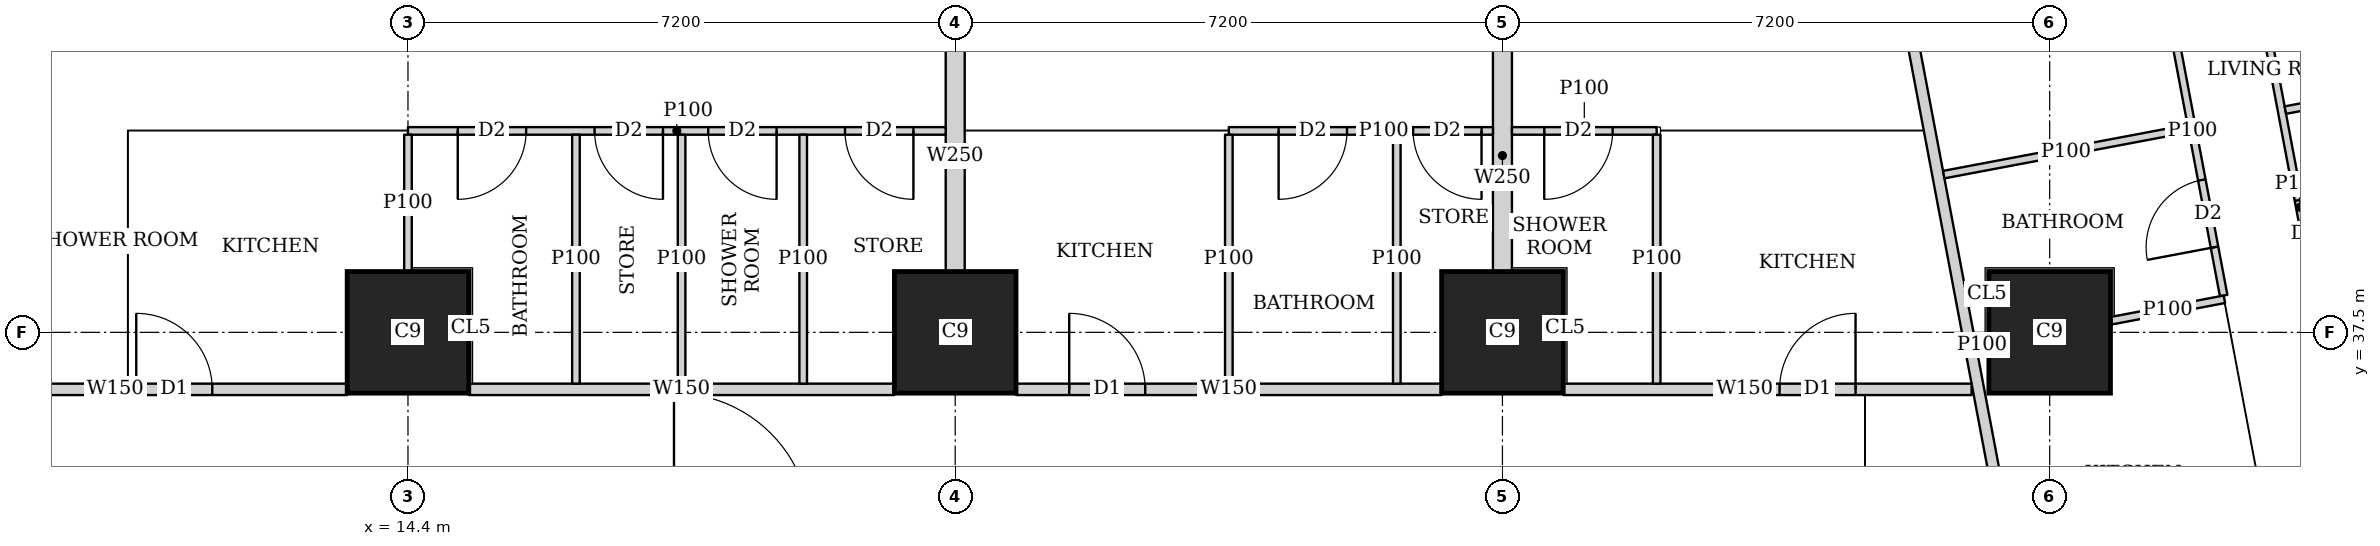
"""IFC4 building model, lengths in metres.
Left out: names, types, materials, properties, quantities, classifications, styles, units other than length and angle.
Written with IfcOpenShell. Run it as: python <this file> out.ifc"""

import sys

from ifc_helpers import new_model, si_unit, direction, frame, frame_2d, origin, origin_2d, place, context, subcontext, project, spatial, rectangle, extrude, element, fill, save


model = new_model("IFC4")
c1 = context("Model", 3, precision=1e-05, world=origin(), true_north=direction((0.0, 1.0)))
c2 = subcontext(c1, "Body", "Model", "MODEL_VIEW")
j1 = project(units=[si_unit("LENGTHUNIT", "METRE"), si_unit("PLANEANGLEUNIT", "RADIAN")], contexts=[c1])
p1 = place(None, origin())
s1 = spatial("IfcSite", under=j1, at=p1, CompositionType="ELEMENT")
p2 = place(p1, origin())
s2 = spatial("IfcBuilding", under=s1, at=p2, CompositionType="ELEMENT")
p3 = place(p2, frame((0.0, 0.0, 122.9)))
s3 = spatial("IfcBuildingStorey", under=s2, at=p3, CompositionType="ELEMENT", Elevation=122.9)
for number, where, z_axis, x_axis in (
    (1, (14.4, 37.5, 0.0), (0.0, 0.0, 1.0), (1.0, 0.0, 0.0)),
    (2, (21.6, 37.5, 0.0), (0.0, 0.0, 1.0), (1.0, 0.0, 0.0)),
    (3, (28.8, 37.5, 0.0), (0.0, 0.0, 1.0), (1.0, 0.0, 0.0)),
    (4, (36.0, 37.5, 0.0), (0.0, 0.0, 1.0), (1.0, 0.0, 0.0)),
):
    element("IfcColumn", number, at=place(p3, frame(where, z_axis=z_axis, x_axis=x_axis)), inside=s3, PredefinedType="COLUMN", context=c2, shape_type="SweptSolid", body=[
        extrude(rectangle(XDim=1.6, YDim=1.6, at=origin_2d()), origin(), (0.0, 0.0, 1.0), 3.75),
    ])
p4 = place(p3, frame((8.1, 36.75, 0.0), z_axis=(0.0, 0.0, 1.0), x_axis=(1.0, 0.0, 0.0)))
e5 = element("IfcWall", 5, at=p4, inside=s3, PredefinedType="SOLIDWALL", context=c2, shape_type="SweptSolid", body=[
    extrude(rectangle(XDim=5.499, YDim=0.15, at=frame_2d((2.75, 0.0))), origin(), (0.0, 0.0, 1.0), 3.5),
])
p5 = place(p4, frame((2.725, 0.0, 0.0)))
e6 = element("IfcOpeningElement", 6, at=p5, cuts=e5, PredefinedType="OPENING", context=c2, shape_type="SweptSolid", body=[
    extrude(rectangle(XDim=1.0, YDim=2.1, at=frame_2d((0.5, 1.05))), frame((0.0, 0.085, 0.0), z_axis=(0.0, -1.0, 0.0), x_axis=(1.0, 0.0, 0.0)), (0.0, 0.0, 1.0), 0.17),
])
p6 = place(p3, frame((15.201, 36.75, 0.0), z_axis=(0.0, 0.0, 1.0), x_axis=(1.0, 0.0, 0.0)))
e7 = element("IfcWall", 7, at=p6, inside=s3, PredefinedType="SOLIDWALL", context=c2, shape_type="SweptSolid", body=[
    extrude(rectangle(XDim=5.598, YDim=0.15, at=frame_2d((2.799, 0.0))), origin(), (0.0, 0.0, 1.0), 3.5),
])
p7 = place(p3, frame((22.401, 36.75, 0.0), z_axis=(0.0, 0.0, 1.0), x_axis=(1.0, 0.0, 0.0)))
e8 = element("IfcWall", 8, at=p7, inside=s3, PredefinedType="SOLIDWALL", context=c2, shape_type="SweptSolid", body=[
    extrude(rectangle(XDim=5.598, YDim=0.15, at=frame_2d((2.799, 0.0))), origin(), (0.0, 0.0, 1.0), 3.5),
])
p8 = place(p7, frame((0.699, 0.0, 0.0)))
e9 = element("IfcOpeningElement", 9, at=p8, cuts=e8, PredefinedType="OPENING", context=c2, shape_type="SweptSolid", body=[
    extrude(rectangle(XDim=1.0, YDim=2.1, at=frame_2d((0.5, 1.05))), frame((0.0, 0.085, 0.0), z_axis=(0.0, -1.0, 0.0), x_axis=(1.0, 0.0, 0.0)), (0.0, 0.0, 1.0), 0.17),
])
p9 = place(p3, frame((29.601, 36.75, 0.0), z_axis=(0.0, 0.0, 1.0), x_axis=(1.0, 0.0, 0.0)))
e10 = element("IfcWall", 10, at=p9, inside=s3, PredefinedType="SOLIDWALL", context=c2, shape_type="SweptSolid", body=[
    extrude(rectangle(XDim=5.372, YDim=0.15, at=frame_2d((2.686, 0.0))), origin(), (0.0, 0.0, 1.0), 3.5),
])
p10 = place(p9, frame((2.845, 0.0, 0.0)))
e11 = element("IfcOpeningElement", 11, at=p10, cuts=e10, PredefinedType="OPENING", context=c2, shape_type="SweptSolid", body=[
    extrude(rectangle(XDim=1.0, YDim=2.1, at=frame_2d((0.5, 1.05))), frame((0.0, 0.085, 0.0), z_axis=(0.0, -1.0, 0.0), x_axis=(1.0, 0.0, 0.0)), (0.0, 0.0, 1.0), 0.17),
])
p11 = place(p3, frame((33.382, 45.65, 0.0), z_axis=(0.0, 0.0, 1.0), x_axis=(0.185593544777, -0.982626600565, 0.0)))
e12 = element("IfcWall", 12, at=p11, inside=s3, PredefinedType="SOLIDWALL", context=c2, shape_type="SweptSolid", body=[
    extrude(rectangle(XDim=47.118, YDim=0.15, at=frame_2d((23.559, 0.0))), origin(), (0.0, 0.0, 1.0), 2.2),
])
p12 = place(p11, frame((10.662, 0.0, 0.0)))
e13 = element("IfcOpeningElement", 13, at=p12, cuts=e12, PredefinedType="OPENING", context=c2, shape_type="SweptSolid", body=[
    extrude(rectangle(XDim=1.0, YDim=2.1, at=frame_2d((0.5, 1.05))), frame((0.0, 0.085, 0.0), z_axis=(0.0, -1.0, 0.0), x_axis=(1.0, 0.0, 0.0)), (0.0, 0.0, 1.0), 0.17),
])
p13 = place(p11, frame((15.237, 0.0, 0.0)))
e14 = element("IfcOpeningElement", 14, at=p13, cuts=e12, PredefinedType="OPENING", context=c2, shape_type="SweptSolid", body=[
    extrude(rectangle(XDim=1.0, YDim=2.1, at=frame_2d((0.5, 1.05))), frame((0.0, 0.085, 0.0), z_axis=(0.0, -1.0, 0.0), x_axis=(1.0, 0.0, 0.0)), (0.0, 0.0, 1.0), 0.17),
])
p14 = place(p11, frame((22.87, 0.0, 0.0)))
e15 = element("IfcOpeningElement", 15, at=p14, cuts=e12, PredefinedType="OPENING", context=c2, shape_type="SweptSolid", body=[
    extrude(rectangle(XDim=1.0, YDim=2.1, at=frame_2d((0.5, 1.05))), frame((0.0, 0.085, 0.0), z_axis=(0.0, -1.0, 0.0), x_axis=(1.0, 0.0, 0.0)), (0.0, 0.0, 1.0), 0.17),
])
p15 = place(p11, frame((33.833, 0.0, 0.0)))
e16 = element("IfcOpeningElement", 16, at=p15, cuts=e12, PredefinedType="OPENING", context=c2, shape_type="SweptSolid", body=[
    extrude(rectangle(XDim=1.0, YDim=2.1, at=frame_2d((0.5, 1.05))), frame((0.0, 0.085, 0.0), z_axis=(0.0, -1.0, 0.0), x_axis=(1.0, 0.0, 0.0)), (0.0, 0.0, 1.0), 0.17),
])
p16 = place(p3, frame((38.862, 41.42, 0.0), z_axis=(0.0, 0.0, 1.0), x_axis=(0.185332907641, -0.982675792592, 0.0)))
e17 = element("IfcWall", 17, at=p16, inside=s3, PredefinedType="PARTITIONING", context=c2, shape_type="SweptSolid", body=[
    extrude(rectangle(XDim=4.629, YDim=0.1, at=frame_2d((2.314, 0.0))), origin(), (0.0, 0.0, 1.0), 3.5),
])
p17 = place(p16, frame((2.22, 0.0, 0.0)))
e18 = element("IfcOpeningElement", 18, at=p17, cuts=e17, PredefinedType="OPENING", context=c2, shape_type="SweptSolid", body=[
    extrude(rectangle(XDim=0.9, YDim=2.1, at=frame_2d((0.45, 1.05))), frame((0.0, 0.06, 0.0), z_axis=(0.0, -1.0, 0.0), x_axis=(1.0, 0.0, 0.0)), (0.0, 0.0, 1.0), 0.12),
])
p18 = place(p3, frame((37.472, 42.309, 0.0), z_axis=(0.0, 0.0, 1.0), x_axis=(0.185641287362, -0.982617581985, 0.0)))
e19 = element("IfcWall", 19, at=p18, inside=s3, PredefinedType="PARTITIONING", context=c2, shape_type="SweptSolid", body=[
    extrude(rectangle(XDim=4.402, YDim=0.1, at=frame_2d((2.201, 0.0))), origin(), (0.0, 0.0, 1.0), 3.5),
])
p19 = place(p18, frame((2.854, 0.0, 0.0)))
e20 = element("IfcOpeningElement", 20, at=p19, cuts=e19, PredefinedType="OPENING", context=c2, shape_type="SweptSolid", body=[
    extrude(rectangle(XDim=0.9, YDim=2.1, at=frame_2d((0.45, 1.05))), frame((0.0, 0.06, 0.0), z_axis=(0.0, -1.0, 0.0), x_axis=(1.0, 0.0, 0.0)), (0.0, 0.0, 1.0), 0.12),
])
p20 = place(p3, frame((43.277, 41.212, 0.0), z_axis=(0.0, 0.0, 1.0), x_axis=(-0.982665405803, -0.185387972203, 0.0)))
e21 = element("IfcWall", 21, at=p20, inside=s3, PredefinedType="PARTITIONING", context=c2, shape_type="SweptSolid", body=[
    extrude(rectangle(XDim=4.25, YDim=0.1, at=frame_2d((2.125, 0.0))), origin(), (0.0, 0.0, 1.0), 2.05),
])
p21 = place(p3, frame((37.823, 40.182, 0.0), z_axis=(0.0, 0.0, 1.0), x_axis=(-0.982664729897, -0.18539155487, 0.0)))
e22 = element("IfcWall", 22, at=p21, inside=s3, PredefinedType="PARTITIONING", context=c2, shape_type="SweptSolid", body=[
    extrude(rectangle(XDim=3.274, YDim=0.1, at=frame_2d((1.637, 0.0))), origin(), (0.0, 0.0, 1.0), 3.5),
])
p22 = place(p3, frame((38.299, 37.935, 0.0), z_axis=(0.0, 0.0, 1.0), x_axis=(-0.982536828695, -0.186068213993, 0.0)))
e23 = element("IfcWall", 23, at=p22, inside=s3, PredefinedType="PARTITIONING", context=c2, shape_type="SweptSolid", body=[
    extrude(rectangle(XDim=1.515, YDim=0.1, at=frame_2d((0.758, 0.0))), origin(), (0.0, 0.0, 1.0), 3.5),
])
p23 = place(p3, frame((35.19, 37.347, 0.0), z_axis=(0.0, 0.0, 1.0), x_axis=(-0.982404955251, -0.186763229514, 0.0)))
e24 = element("IfcWall", 24, at=p23, inside=s3, PredefinedType="PARTITIONING", context=c2, shape_type="SweptSolid", body=[
    extrude(rectangle(XDim=0.161, YDim=0.1, at=frame_2d((0.081, 0.0))), origin(), (0.0, 0.0, 1.0), 3.5),
])
p24 = place(p3, frame((14.4, 40.15, 0.0), z_axis=(0.0, 0.0, 1.0), x_axis=(1.0, 0.0, 0.0)))
e25 = element("IfcWall", 25, at=p24, inside=s3, PredefinedType="PARTITIONING", context=c2, shape_type="SweptSolid", body=[
    extrude(rectangle(XDim=7.075, YDim=0.1, at=frame_2d((3.538, 0.0))), origin(), (0.0, 0.0, 1.0), 3.5),
])
p25 = place(p24, frame((0.655, 0.0, 0.0)))
e26 = element("IfcOpeningElement", 26, at=p25, cuts=e25, PredefinedType="OPENING", context=c2, shape_type="SweptSolid", body=[
    extrude(rectangle(XDim=0.9, YDim=2.1, at=frame_2d((0.45, 1.05))), frame((0.0, 0.06, 0.0), z_axis=(0.0, -1.0, 0.0), x_axis=(1.0, 0.0, 0.0)), (0.0, 0.0, 1.0), 0.12),
])
p26 = place(p24, frame((3.95, 0.0, 0.0)))
e27 = element("IfcOpeningElement", 27, at=p26, cuts=e25, PredefinedType="OPENING", context=c2, shape_type="SweptSolid", body=[
    extrude(rectangle(XDim=0.9, YDim=2.1, at=frame_2d((0.45, 1.05))), frame((0.0, 0.06, 0.0), z_axis=(0.0, -1.0, 0.0), x_axis=(1.0, 0.0, 0.0)), (0.0, 0.0, 1.0), 0.12),
])
p27 = place(p24, frame((2.455, 0.0, 0.0)))
e28 = element("IfcOpeningElement", 28, at=p27, cuts=e25, PredefinedType="OPENING", context=c2, shape_type="SweptSolid", body=[
    extrude(rectangle(XDim=0.9, YDim=2.1, at=frame_2d((0.45, 1.05))), frame((0.0, 0.06, 0.0), z_axis=(0.0, -1.0, 0.0), x_axis=(1.0, 0.0, 0.0)), (0.0, 0.0, 1.0), 0.12),
])
p28 = place(p24, frame((5.75, 0.0, 0.0)))
e29 = element("IfcOpeningElement", 29, at=p28, cuts=e25, PredefinedType="OPENING", context=c2, shape_type="SweptSolid", body=[
    extrude(rectangle(XDim=0.9, YDim=2.1, at=frame_2d((0.45, 1.05))), frame((0.0, 0.06, 0.0), z_axis=(0.0, -1.0, 0.0), x_axis=(1.0, 0.0, 0.0)), (0.0, 0.0, 1.0), 0.12),
])
p29 = place(p3, frame((14.4, 38.301, 0.0), z_axis=(0.0, 0.0, 1.0), x_axis=(0.0, 1.0, 0.0)))
e30 = element("IfcWall", 30, at=p29, inside=s3, PredefinedType="PARTITIONING", context=c2, shape_type="SweptSolid", body=[
    extrude(rectangle(XDim=1.799, YDim=0.1, at=frame_2d((0.899, 0.0))), origin(), (0.0, 0.0, 1.0), 3.5),
])
for number, where, z_axis, x_axis in (
    (31, (18.0, 36.825, 0.0), (0.0, 0.0, 1.0), (0.0, 1.0, 0.0)),
    (32, (16.61, 36.825, 0.0), (0.0, 0.0, 1.0), (0.0, 1.0, 0.0)),
    (33, (19.6, 36.825, 0.0), (0.0, 0.0, 1.0), (0.0, 1.0, 0.0)),
):
    element("IfcWall", number, at=place(p3, frame(where, z_axis=z_axis, x_axis=x_axis)), inside=s3, PredefinedType="PARTITIONING", context=c2, shape_type="SweptSolid", body=[
        extrude(rectangle(XDim=3.275, YDim=0.1, at=frame_2d((1.638, 0.0))), origin(), (0.0, 0.0, 1.0), 3.5),
    ])
p30 = place(p3, frame((25.2, 40.15, 0.0), z_axis=(0.0, 0.0, 1.0), x_axis=(1.0, 0.0, 0.0)))
e34 = element("IfcWall", 34, at=p30, inside=s3, PredefinedType="PARTITIONING", context=c2, shape_type="SweptSolid", body=[
    extrude(rectangle(XDim=3.475, YDim=0.1, at=frame_2d((1.738, 0.0))), origin(), (0.0, 0.0, 1.0), 3.5),
])
p31 = place(p30, frame((0.655, 0.0, 0.0)))
e35 = element("IfcOpeningElement", 35, at=p31, cuts=e34, PredefinedType="OPENING", context=c2, shape_type="SweptSolid", body=[
    extrude(rectangle(XDim=0.9, YDim=2.1, at=frame_2d((0.45, 1.05))), frame((0.0, 0.06, 0.0), z_axis=(0.0, -1.0, 0.0), x_axis=(1.0, 0.0, 0.0)), (0.0, 0.0, 1.0), 0.12),
])
p32 = place(p30, frame((2.425, 0.0, 0.0)))
e36 = element("IfcOpeningElement", 36, at=p32, cuts=e34, PredefinedType="OPENING", context=c2, shape_type="SweptSolid", body=[
    extrude(rectangle(XDim=0.9, YDim=2.1, at=frame_2d((0.45, 1.05))), frame((0.0, 0.06, 0.0), z_axis=(0.0, -1.0, 0.0), x_axis=(1.0, 0.0, 0.0)), (0.0, 0.0, 1.0), 0.12),
])
for number, where, z_axis, x_axis in (
    (37, (25.2, 36.825, 0.0), (0.0, 0.0, 1.0), (0.0, 1.0, 0.0)),
    (38, (27.41, 36.825, 0.0), (0.0, 0.0, 1.0), (0.0, 1.0, 0.0)),
):
    element("IfcWall", number, at=place(p3, frame(where, z_axis=z_axis, x_axis=x_axis)), inside=s3, PredefinedType="PARTITIONING", context=c2, shape_type="SweptSolid", body=[
        extrude(rectangle(XDim=3.275, YDim=0.1, at=frame_2d((1.638, 0.0))), origin(), (0.0, 0.0, 1.0), 3.5),
    ])
p33 = place(p3, frame((21.6, 38.301, 0.0), z_axis=(0.0, 0.0, 1.0), x_axis=(0.0, 1.0, 0.0)))
e39 = element("IfcWall", 39, at=p33, inside=s3, PredefinedType="SOLIDWALL", context=c2, shape_type="SweptSolid", body=[
    extrude(rectangle(XDim=3.049, YDim=0.25, at=frame_2d((1.524, 0.0))), origin(), (0.0, 0.0, 1.0), 3.5),
])
p34 = place(p3, frame((28.925, 40.15, 0.0), z_axis=(0.0, 0.0, 1.0), x_axis=(1.0, 0.0, 0.0)))
e40 = element("IfcWall", 40, at=p34, inside=s3, PredefinedType="PARTITIONING", context=c2, shape_type="SweptSolid", body=[
    extrude(rectangle(XDim=1.904, YDim=0.1, at=frame_2d((0.952, 0.0))), origin(), (0.0, 0.0, 1.0), 3.5),
])
p35 = place(p34, frame((0.425, 0.0, 0.0)))
e41 = element("IfcOpeningElement", 41, at=p35, cuts=e40, PredefinedType="OPENING", context=c2, shape_type="SweptSolid", body=[
    extrude(rectangle(XDim=0.9, YDim=2.1, at=frame_2d((0.45, 1.05))), frame((0.0, 0.06, 0.0), z_axis=(0.0, -1.0, 0.0), x_axis=(1.0, 0.0, 0.0)), (0.0, 0.0, 1.0), 0.12),
])
p36 = place(p3, frame((30.829, 36.825, 0.0), z_axis=(0.0, 0.0, 1.0), x_axis=(0.0, 1.0, 0.0)))
e42 = element("IfcWall", 42, at=p36, inside=s3, PredefinedType="PARTITIONING", context=c2, shape_type="SweptSolid", body=[
    extrude(rectangle(XDim=3.275, YDim=0.1, at=frame_2d((1.638, 0.0))), origin(), (0.0, 0.0, 1.0), 3.5),
])
p37 = place(p3, frame((28.8, 38.301, 0.0), z_axis=(0.0, 0.0, 1.0), x_axis=(0.0, 1.0, 0.0)))
e43 = element("IfcWall", 43, at=p37, inside=s3, PredefinedType="SOLIDWALL", context=c2, shape_type="SweptSolid", body=[
    extrude(rectangle(XDim=3.049, YDim=0.25, at=frame_2d((1.524, 0.0))), origin(), (0.0, 0.0, 1.0), 3.5),
])
p38 = place(p17, origin())
e44 = element("IfcDoor", 44, at=p38, inside=s3, OperationType="SINGLE_SWING_LEFT", PredefinedType="DOOR", context=c2, shape_type="SweptSolid", body=[
    extrude(rectangle(XDim=0.9, YDim=2.1, at=frame_2d((0.45, 1.05))), frame((0.0, 0.025, 0.0), z_axis=(0.0, -1.0, 0.0), x_axis=(1.0, 0.0, 0.0)), (0.0, 0.0, 1.0), 0.05),
])
fill(e18, e44)
p39 = place(p19, origin())
e45 = element("IfcDoor", 45, at=p39, inside=s3, OperationType="SINGLE_SWING_LEFT", PredefinedType="DOOR", context=c2, shape_type="SweptSolid", body=[
    extrude(rectangle(XDim=0.9, YDim=2.1, at=frame_2d((0.45, 1.05))), frame((0.0, 0.025, 0.0), z_axis=(0.0, -1.0, 0.0), x_axis=(1.0, 0.0, 0.0)), (0.0, 0.0, 1.0), 0.05),
])
fill(e20, e45)
p40 = place(p25, origin())
e46 = element("IfcDoor", 46, at=p40, inside=s3, OperationType="SINGLE_SWING_RIGHT", PredefinedType="DOOR", context=c2, shape_type="SweptSolid", body=[
    extrude(rectangle(XDim=0.9, YDim=2.1, at=frame_2d((0.45, 1.05))), frame((0.0, 0.025, 0.0), z_axis=(0.0, -1.0, 0.0), x_axis=(1.0, 0.0, 0.0)), (0.0, 0.0, 1.0), 0.05),
])
fill(e26, e46)
p41 = place(p26, origin())
e47 = element("IfcDoor", 47, at=p41, inside=s3, OperationType="SINGLE_SWING_LEFT", PredefinedType="DOOR", context=c2, shape_type="SweptSolid", body=[
    extrude(rectangle(XDim=0.9, YDim=2.1, at=frame_2d((0.45, 1.05))), frame((0.0, 0.025, 0.0), z_axis=(0.0, -1.0, 0.0), x_axis=(1.0, 0.0, 0.0)), (0.0, 0.0, 1.0), 0.05),
])
fill(e27, e47)
p42 = place(p27, origin())
e48 = element("IfcDoor", 48, at=p42, inside=s3, OperationType="SINGLE_SWING_LEFT", PredefinedType="DOOR", context=c2, shape_type="SweptSolid", body=[
    extrude(rectangle(XDim=0.9, YDim=2.1, at=frame_2d((0.45, 1.05))), frame((0.0, 0.025, 0.0), z_axis=(0.0, -1.0, 0.0), x_axis=(1.0, 0.0, 0.0)), (0.0, 0.0, 1.0), 0.05),
])
fill(e28, e48)
p43 = place(p28, origin())
e49 = element("IfcDoor", 49, at=p43, inside=s3, OperationType="SINGLE_SWING_LEFT", PredefinedType="DOOR", context=c2, shape_type="SweptSolid", body=[
    extrude(rectangle(XDim=0.9, YDim=2.1, at=frame_2d((0.45, 1.05))), frame((0.0, 0.025, 0.0), z_axis=(0.0, -1.0, 0.0), x_axis=(1.0, 0.0, 0.0)), (0.0, 0.0, 1.0), 0.05),
])
fill(e29, e49)
p44 = place(p5, origin())
e50 = element("IfcDoor", 50, at=p44, inside=s3, OperationType="SINGLE_SWING_LEFT", PredefinedType="DOOR", context=c2, shape_type="SweptSolid", body=[
    extrude(rectangle(XDim=1.0, YDim=2.1, at=frame_2d((0.5, 1.05))), frame((0.0, 0.025, 0.0), z_axis=(0.0, -1.0, 0.0), x_axis=(1.0, 0.0, 0.0)), (0.0, 0.0, 1.0), 0.05),
])
fill(e6, e50)
p45 = place(p31, origin())
e51 = element("IfcDoor", 51, at=p45, inside=s3, OperationType="SINGLE_SWING_RIGHT", PredefinedType="DOOR", context=c2, shape_type="SweptSolid", body=[
    extrude(rectangle(XDim=0.9, YDim=2.1, at=frame_2d((0.45, 1.05))), frame((0.0, 0.025, 0.0), z_axis=(0.0, -1.0, 0.0), x_axis=(1.0, 0.0, 0.0)), (0.0, 0.0, 1.0), 0.05),
])
fill(e35, e51)
p46 = place(p32, origin())
e52 = element("IfcDoor", 52, at=p46, inside=s3, OperationType="SINGLE_SWING_LEFT", PredefinedType="DOOR", context=c2, shape_type="SweptSolid", body=[
    extrude(rectangle(XDim=0.9, YDim=2.1, at=frame_2d((0.45, 1.05))), frame((0.0, 0.025, 0.0), z_axis=(0.0, -1.0, 0.0), x_axis=(1.0, 0.0, 0.0)), (0.0, 0.0, 1.0), 0.05),
])
fill(e36, e52)
p47 = place(p8, origin())
e53 = element("IfcDoor", 53, at=p47, inside=s3, OperationType="SINGLE_SWING_LEFT", PredefinedType="DOOR", context=c2, shape_type="SweptSolid", body=[
    extrude(rectangle(XDim=1.0, YDim=2.1, at=frame_2d((0.5, 1.05))), frame((0.0, 0.025, 0.0), z_axis=(0.0, -1.0, 0.0), x_axis=(1.0, 0.0, 0.0)), (0.0, 0.0, 1.0), 0.05),
])
fill(e9, e53)
p48 = place(p35, origin())
e54 = element("IfcDoor", 54, at=p48, inside=s3, OperationType="SINGLE_SWING_RIGHT", PredefinedType="DOOR", context=c2, shape_type="SweptSolid", body=[
    extrude(rectangle(XDim=0.9, YDim=2.1, at=frame_2d((0.45, 1.05))), frame((0.0, 0.025, 0.0), z_axis=(0.0, -1.0, 0.0), x_axis=(1.0, 0.0, 0.0)), (0.0, 0.0, 1.0), 0.05),
])
fill(e41, e54)
p49 = place(p10, origin())
e55 = element("IfcDoor", 55, at=p49, inside=s3, OperationType="SINGLE_SWING_RIGHT", PredefinedType="DOOR", context=c2, shape_type="SweptSolid", body=[
    extrude(rectangle(XDim=1.0, YDim=2.1, at=frame_2d((0.5, 1.05))), frame((0.0, 0.025, 0.0), z_axis=(0.0, -1.0, 0.0), x_axis=(1.0, 0.0, 0.0)), (0.0, 0.0, 1.0), 0.05),
])
fill(e11, e55)
save(model, sys.argv[1])
